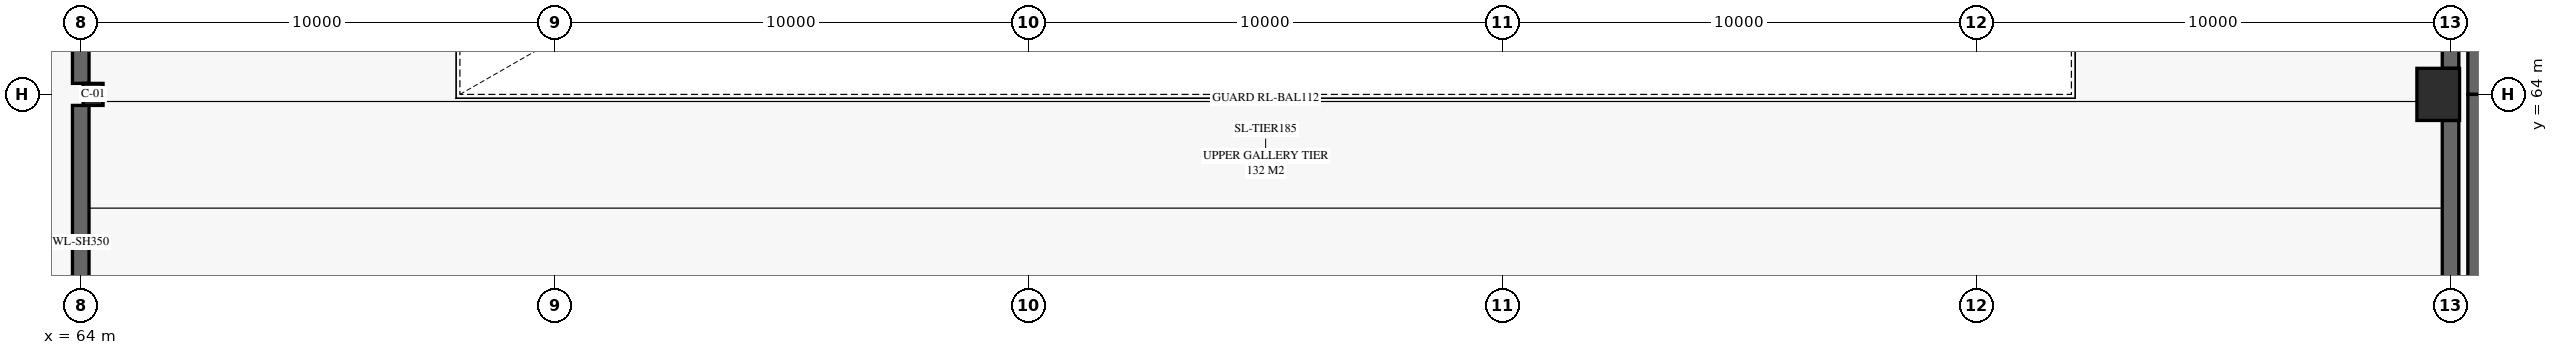
"""IFC4 building model, lengths in metres.
Left out: names, types, materials, properties, quantities, classifications, styles, units other than length and angle.
Written with IfcOpenShell. Run it as: python <this file> out.ifc"""

import sys

from ifc_helpers import new_model, si_unit, direction, frame, frame_2d, origin, origin_2d, place, context, subcontext, project, spatial, rectangle, i_section, extrude, element, save


model = new_model("IFC4")
c1 = context("Model", 3, precision=1e-05, world=origin(), true_north=direction((0.0, 1.0)))
c2 = subcontext(c1, "Body", "Model", "MODEL_VIEW")
j1 = project(units=[si_unit("LENGTHUNIT", "METRE"), si_unit("PLANEANGLEUNIT", "RADIAN")], contexts=[c1])
p1 = place(None, origin())
s1 = spatial("IfcSite", under=j1, at=p1, CompositionType="ELEMENT")
p2 = place(p1, origin())
s2 = spatial("IfcBuilding", under=s1, at=p2, CompositionType="ELEMENT")
p3 = place(p2, frame((0.0, 0.0, 20.0)))
s3 = spatial("IfcBuildingStorey", under=s2, at=p3, CompositionType="ELEMENT", Elevation=20.0)
p4 = place(p3, frame((64.26, 64.0, 0.0), z_axis=(0.0, 0.0, 1.0), x_axis=(1.0, 0.0, 0.0)))
e1 = element("IfcColumn", 1, at=p4, inside=s3, PredefinedType="COLUMN", context=c2, shape_type="SweptSolid", body=[
    extrude(i_section(OverallWidth=0.422, OverallDepth=0.465, WebThickness=0.045, FlangeThickness=0.073, FilletRadius=0.02, at=origin_2d()), origin(), (0.0, 0.0, 1.0), 4.8),
])
p5 = place(p3, frame((113.74, 64.0, 0.0), z_axis=(0.0, 0.0, 1.0), x_axis=(1.0, 0.0, 0.0)))
e2 = element("IfcColumn", 2, at=p5, inside=s3, PredefinedType="COLUMN", context=c2, shape_type="SweptSolid", body=[
    extrude(rectangle(XDim=0.9, YDim=1.1, at=origin_2d()), origin(), (0.0, 0.0, 1.0), 4.8),
])
p6 = place(p3, frame((64.0, 58.0, 0.0), z_axis=(0.0, 0.0, 1.0), x_axis=(0.0, 1.0, 0.0)))
e3 = element("IfcWall", 3, at=p6, inside=s3, PredefinedType="SHEAR", context=c2, shape_type="SweptSolid", body=[
    extrude(rectangle(XDim=5.768, YDim=0.35, at=frame_2d((2.884, 0.0))), origin(), (0.0, 0.0, 1.0), 4.5),
])
p7 = place(p3, frame((64.0, 64.232, 0.0), z_axis=(0.0, 0.0, 1.0), x_axis=(0.0, 1.0, 0.0)))
e4 = element("IfcWall", 4, at=p7, inside=s3, PredefinedType="SHEAR", context=c2, shape_type="SweptSolid", body=[
    extrude(rectangle(XDim=9.218, YDim=0.35, at=frame_2d((4.609, 0.0))), origin(), (0.0, 0.0, 1.0), 4.5),
])
p8 = place(p3, frame((114.0, 58.0, 0.0), z_axis=(0.0, 0.0, 1.0), x_axis=(0.0, 1.0, 0.0)))
e5 = element("IfcWall", 5, at=p8, inside=s3, PredefinedType="SHEAR", context=c2, shape_type="SweptSolid", body=[
    extrude(rectangle(XDim=5.45, YDim=0.35, at=frame_2d((2.725, 0.0))), origin(), (0.0, 0.0, 1.0), 4.5),
])
p9 = place(p3, frame((114.0, 64.55, 0.0), z_axis=(0.0, 0.0, 1.0), x_axis=(0.0, 1.0, 0.0)))
e6 = element("IfcWall", 6, at=p9, inside=s3, PredefinedType="SHEAR", context=c2, shape_type="SweptSolid", body=[
    extrude(rectangle(XDim=9.218, YDim=0.35, at=frame_2d((4.609, 0.0))), origin(), (0.0, 0.0, 1.0), 4.5),
])
p10 = place(p3, frame((114.54, 74.0, 0.0), z_axis=(0.0, 0.0, 1.0), x_axis=(0.0, -1.0, 0.0)))
e7 = element("IfcWall", 7, at=p10, inside=s3, PredefinedType="SHEAR", context=c2, shape_type="SweptSolid", body=[
    extrude(rectangle(XDim=10.0, YDim=0.35, at=frame_2d((5.0, 0.0))), origin(), (0.0, 0.0, 1.0), 4.5),
])
p11 = place(p3, frame((114.54, 64.0, 0.0), z_axis=(0.0, 0.0, 1.0), x_axis=(0.0, -1.0, 0.0)))
e8 = element("IfcWall", 8, at=p11, inside=s3, PredefinedType="SHEAR", context=c2, shape_type="SweptSolid", body=[
    extrude(rectangle(XDim=10.68, YDim=0.35, at=frame_2d((5.34, 0.0))), origin(), (0.0, 0.0, 1.0), 4.5),
])
p12 = place(p11, frame((6.19, 0.0, 0.0)))
e9 = element("IfcOpeningElement", 9, at=p12, cuts=e8, PredefinedType="OPENING", context=c2, shape_type="SweptSolid", body=[
    extrude(rectangle(XDim=1.1, YDim=2.25, at=frame_2d((0.55, 1.125))), frame((0.0, 0.185, 0.0), z_axis=(0.0, -1.0, 0.0), x_axis=(1.0, 0.0, 0.0)), (0.0, 0.0, 1.0), 0.37),
])
save(model, sys.argv[1])
